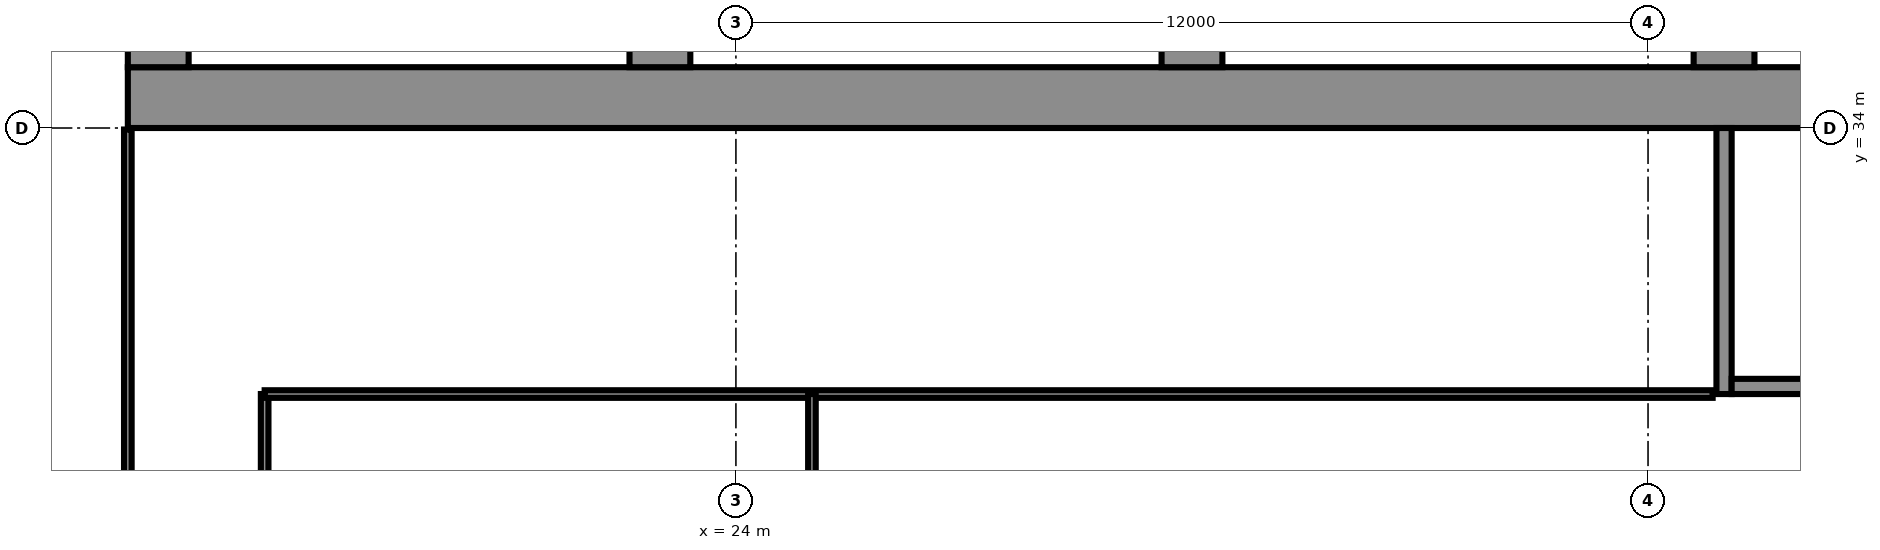
"""IFC4 building model, lengths in metres.
Left out: names, types, materials, properties, quantities, classifications, styles, units other than length and angle.
Written with IfcOpenShell. Run it as: python <this file> out.ifc"""

import sys

from ifc_helpers import new_model, si_unit, direction, frame, frame_2d, origin, place, context, subcontext, project, spatial, polyline, rectangle, outline, extrude, element, fill, save


model = new_model("IFC4")
c1 = context("Model", 3, precision=1e-05, world=origin(), true_north=direction((0.0, 1.0)))
c2 = subcontext(c1, "Body", "Model", "MODEL_VIEW")
j1 = project(units=[si_unit("LENGTHUNIT", "METRE"), si_unit("PLANEANGLEUNIT", "RADIAN")], contexts=[c1])
p1 = place(None, origin())
s1 = spatial("IfcSite", under=j1, at=p1, CompositionType="ELEMENT")
p2 = place(p1, origin())
s2 = spatial("IfcBuilding", under=s1, at=p2, CompositionType="ELEMENT")
p3 = place(p2, frame((0.0, 0.0, 151.9)))
s3 = spatial("IfcBuildingStorey", under=s2, at=p3, CompositionType="ELEMENT", Elevation=151.9)
p4 = place(p3, frame((16.0, 34.4, 0.0), z_axis=(0.0, 0.0, 1.0), x_axis=(1.0, 0.0, 0.0)))
e1 = element("IfcWall", 1, at=p4, inside=s3, PredefinedType="SHEAR", context=c2, shape_type="SweptSolid", body=[
    extrude(rectangle(XDim=42.0, YDim=0.8, at=frame_2d((21.0, 0.0))), origin(), (0.0, 0.0, 1.0), 3.6),
])
p5 = place(p4, frame((3.2, 0.0, 0.0)))
e2 = element("IfcOpeningElement", 2, at=p5, cuts=e1, PredefinedType="OPENING", context=c2, shape_type="SweptSolid", body=[
    extrude(rectangle(XDim=1.0, YDim=2.1, at=frame_2d((0.5, 1.05))), frame((0.0, 0.41, 0.0), z_axis=(0.0, -1.0, 0.0), x_axis=(1.0, 0.0, 0.0)), (0.0, 0.0, 1.0), 0.82),
])
p6 = place(p4, frame((7.65, 0.0, 0.0)))
e3 = element("IfcOpeningElement", 3, at=p6, cuts=e1, PredefinedType="OPENING", context=c2, shape_type="SweptSolid", body=[
    extrude(rectangle(XDim=1.2, YDim=2.1, at=frame_2d((0.6, 1.05))), frame((0.0, 0.41, 0.0), z_axis=(0.0, -1.0, 0.0), x_axis=(1.0, 0.0, 0.0)), (0.0, 0.0, 1.0), 0.82),
])
p7 = place(p4, frame((14.767, 0.0, 0.0)))
e4 = element("IfcOpeningElement", 4, at=p7, cuts=e1, PredefinedType="OPENING", context=c2, shape_type="SweptSolid", body=[
    extrude(rectangle(XDim=1.1, YDim=2.1, at=frame_2d((0.55, 1.05))), frame((0.0, 0.41, 0.0), z_axis=(0.0, -1.0, 0.0), x_axis=(1.0, 0.0, 0.0)), (0.0, 0.0, 1.0), 0.82),
])
p8 = place(p4, frame((19.133, 0.0, 0.0)))
e5 = element("IfcOpeningElement", 5, at=p8, cuts=e1, PredefinedType="OPENING", context=c2, shape_type="SweptSolid", body=[
    extrude(rectangle(XDim=1.1, YDim=2.1, at=frame_2d((0.55, 1.05))), frame((0.0, 0.41, 0.0), z_axis=(0.0, -1.0, 0.0), x_axis=(1.0, 0.0, 0.0)), (0.0, 0.0, 1.0), 0.82),
])
p9 = place(p4, frame((16.8, 0.0, 0.0)))
e6 = element("IfcOpeningElement", 6, at=p9, cuts=e1, PredefinedType="OPENING", context=c2, shape_type="SweptSolid", body=[
    extrude(rectangle(XDim=1.4, YDim=2.1, at=frame_2d((0.7, 1.05))), frame((0.0, 0.41, 0.0), z_axis=(0.0, -1.0, 0.0), x_axis=(1.0, 0.0, 0.0)), (0.0, 0.0, 1.0), 0.82),
])
p10 = place(p4, frame((21.767, 0.0, 0.0)))
e7 = element("IfcOpeningElement", 7, at=p10, cuts=e1, PredefinedType="OPENING", context=c2, shape_type="SweptSolid", body=[
    extrude(rectangle(XDim=1.1, YDim=2.1, at=frame_2d((0.55, 1.05))), frame((0.0, 0.41, 0.0), z_axis=(0.0, -1.0, 0.0), x_axis=(1.0, 0.0, 0.0)), (0.0, 0.0, 1.0), 0.82),
])
p11 = place(p4, frame((23.95, 0.0, 0.0)))
e8 = element("IfcOpeningElement", 8, at=p11, cuts=e1, PredefinedType="OPENING", context=c2, shape_type="SweptSolid", body=[
    extrude(rectangle(XDim=1.1, YDim=2.1, at=frame_2d((0.55, 1.05))), frame((0.0, 0.41, 0.0), z_axis=(0.0, -1.0, 0.0), x_axis=(1.0, 0.0, 0.0)), (0.0, 0.0, 1.0), 0.82),
])
p12 = place(p4, frame((26.133, 0.0, 0.0)))
e9 = element("IfcOpeningElement", 9, at=p12, cuts=e1, PredefinedType="OPENING", context=c2, shape_type="SweptSolid", body=[
    extrude(rectangle(XDim=1.1, YDim=2.1, at=frame_2d((0.55, 1.05))), frame((0.0, 0.41, 0.0), z_axis=(0.0, -1.0, 0.0), x_axis=(1.0, 0.0, 0.0)), (0.0, 0.0, 1.0), 0.82),
])
p13 = place(p4, frame((33.15, 0.0, 0.0)))
e10 = element("IfcOpeningElement", 10, at=p13, cuts=e1, PredefinedType="OPENING", context=c2, shape_type="SweptSolid", body=[
    extrude(rectangle(XDim=1.2, YDim=2.1, at=frame_2d((0.6, 1.05))), frame((0.0, 0.41, 0.0), z_axis=(0.0, -1.0, 0.0), x_axis=(1.0, 0.0, 0.0)), (0.0, 0.0, 1.0), 0.82),
])
p14 = place(p4, frame((35.817, 0.0, 0.0)))
e11 = element("IfcOpeningElement", 11, at=p14, cuts=e1, PredefinedType="OPENING", context=c2, shape_type="SweptSolid", body=[
    extrude(rectangle(XDim=1.0, YDim=2.1, at=frame_2d((0.5, 1.05))), frame((0.0, 0.41, 0.0), z_axis=(0.0, -1.0, 0.0), x_axis=(1.0, 0.0, 0.0)), (0.0, 0.0, 1.0), 0.82),
])
p15 = place(p4, frame((39.95, 0.0, 0.0)))
e12 = element("IfcOpeningElement", 12, at=p15, cuts=e1, PredefinedType="OPENING", context=c2, shape_type="SweptSolid", body=[
    extrude(rectangle(XDim=1.0, YDim=2.1, at=frame_2d((0.5, 1.05))), frame((0.0, 0.41, 0.0), z_axis=(0.0, -1.0, 0.0), x_axis=(1.0, 0.0, 0.0)), (0.0, 0.0, 1.0), 0.82),
])
p16 = place(p4, frame((37.767, 0.0, 0.0)))
e13 = element("IfcOpeningElement", 13, at=p16, cuts=e1, PredefinedType="OPENING", context=c2, shape_type="SweptSolid", body=[
    extrude(rectangle(XDim=1.4, YDim=2.1, at=frame_2d((0.7, 1.05))), frame((0.0, 0.41, 0.0), z_axis=(0.0, -1.0, 0.0), x_axis=(1.0, 0.0, 0.0)), (0.0, 0.0, 1.0), 0.82),
])
p17 = place(p3, frame((16.4, 34.8, 0.0), z_axis=(0.0, 0.0, 1.0), x_axis=(0.0, 1.0, 0.0)))
e14 = element("IfcWall", 14, at=p17, inside=s3, PredefinedType="SHEAR", context=c2, shape_type="SweptSolid", body=[
    extrude(rectangle(XDim=13.184, YDim=0.8, at=frame_2d((6.592, 0.0))), origin(), (0.0, 0.0, 1.0), 3.6),
])
p18 = place(p3, frame((23.0, 34.8, 0.0), z_axis=(0.0, 0.0, 1.0), x_axis=(0.0, 1.0, 0.0)))
e15 = element("IfcWall", 15, at=p18, inside=s3, PredefinedType="SHEAR", context=c2, shape_type="SweptSolid", body=[
    extrude(rectangle(XDim=13.762, YDim=0.8, at=frame_2d((6.881, 0.0))), origin(), (0.0, 0.0, 1.0), 3.6),
])
p19 = place(p18, frame((2.55, 0.0, 0.0)))
e16 = element("IfcOpeningElement", 16, at=p19, cuts=e15, PredefinedType="OPENING", context=c2, shape_type="SweptSolid", body=[
    extrude(rectangle(XDim=1.1, YDim=2.1, at=frame_2d((0.55, 1.05))), frame((0.0, 0.41, 0.0), z_axis=(0.0, -1.0, 0.0), x_axis=(1.0, 0.0, 0.0)), (0.0, 0.0, 1.0), 0.82),
])
p20 = place(p18, frame((10.0, 0.0, 0.0)))
e17 = element("IfcOpeningElement", 17, at=p20, cuts=e15, PredefinedType="OPENING", context=c2, shape_type="SweptSolid", body=[
    extrude(rectangle(XDim=1.0, YDim=2.1, at=frame_2d((0.5, 1.05))), frame((0.0, 0.41, 0.0), z_axis=(0.0, -1.0, 0.0), x_axis=(1.0, 0.0, 0.0)), (0.0, 0.0, 1.0), 0.82),
])
p21 = place(p3, frame((30.0, 34.8, 0.0), z_axis=(0.0, 0.0, 1.0), x_axis=(0.0, 1.0, 0.0)))
e18 = element("IfcWall", 18, at=p21, inside=s3, PredefinedType="SHEAR", context=c2, shape_type="SweptSolid", body=[
    extrude(rectangle(XDim=14.374, YDim=0.8, at=frame_2d((7.187, 0.0))), origin(), (0.0, 0.0, 1.0), 3.6),
])
p22 = place(p21, frame((3.6, 0.0, 0.0)))
e19 = element("IfcOpeningElement", 19, at=p22, cuts=e18, PredefinedType="OPENING", context=c2, shape_type="SweptSolid", body=[
    extrude(rectangle(XDim=1.1, YDim=2.1, at=frame_2d((0.55, 1.05))), frame((0.0, 0.41, 0.0), z_axis=(0.0, -1.0, 0.0), x_axis=(1.0, 0.0, 0.0)), (0.0, 0.0, 1.0), 0.82),
])
p23 = place(p3, frame((37.0, 34.8, 0.0), z_axis=(0.0, 0.0, 1.0), x_axis=(0.0, 1.0, 0.0)))
e20 = element("IfcWall", 20, at=p23, inside=s3, PredefinedType="SHEAR", context=c2, shape_type="SweptSolid", body=[
    extrude(rectangle(XDim=14.987, YDim=0.8, at=frame_2d((7.493, 0.0))), origin(), (0.0, 0.0, 1.0), 3.6),
])
p24 = place(p23, frame((11.312, 0.0, 0.0)))
e21 = element("IfcOpeningElement", 21, at=p24, cuts=e20, PredefinedType="OPENING", context=c2, shape_type="SweptSolid", body=[
    extrude(rectangle(XDim=1.0, YDim=2.1, at=frame_2d((0.5, 1.05))), frame((0.0, 0.41, 0.0), z_axis=(0.0, -1.0, 0.0), x_axis=(1.0, 0.0, 0.0)), (0.0, 0.0, 1.0), 0.82),
])
p25 = place(p23, frame((3.6, 0.0, 0.0)))
e22 = element("IfcOpeningElement", 22, at=p25, cuts=e20, PredefinedType="OPENING", context=c2, shape_type="SweptSolid", body=[
    extrude(rectangle(XDim=1.1, YDim=2.1, at=frame_2d((0.55, 1.05))), frame((0.0, 0.41, 0.0), z_axis=(0.0, -1.0, 0.0), x_axis=(1.0, 0.0, 0.0)), (0.0, 0.0, 1.0), 0.82),
])
p26 = place(p3, origin())
e23 = element("IfcWall", 23, at=p26, inside=s3, PredefinedType="PARTITIONING", context=c2, shape_type="SweptSolid", body=[
    extrude(outline(polyline([(32.233, 37.65), (30.4, 37.65), (30.4, 37.85), (32.233, 37.85), (32.433, 37.85), (32.433, 34.8), (32.233, 34.8), (32.233, 37.65)])), origin(), (0.0, 0.0, 1.0), 3.2),
])
p27 = place(p3, origin())
e24 = element("IfcWall", 24, at=p27, inside=s3, PredefinedType="PARTITIONING", context=c2, shape_type="SweptSolid", body=[
    extrude(outline(polyline([(34.567, 37.85), (34.767, 37.85), (36.6, 37.85), (36.6, 37.65), (34.767, 37.65), (34.767, 34.8), (34.567, 34.8), (34.567, 37.85)])), origin(), (0.0, 0.0, 1.0), 3.2),
])
p28 = place(p3, origin())
e25 = element("IfcWall", 25, at=p28, inside=s3, PredefinedType="PARTITIONING", context=c2, shape_type="SweptSolid", body=[
    extrude(outline(polyline([(41.567, 37.1), (39.433, 37.1), (39.433, 34.8), (39.233, 34.8), (39.233, 37.65), (37.4, 37.65), (37.4, 37.85), (39.233, 37.85), (39.433, 37.85), (39.433, 37.3), (41.567, 37.3), (41.567, 37.55), (41.767, 37.55), (43.6, 37.55), (43.6, 37.35), (41.767, 37.35), (41.767, 34.8), (41.567, 34.8), (41.567, 37.1)])), origin(), (0.0, 0.0, 1.0), 3.2),
])
p29 = place(p3, frame((37.0, 30.5, 0.0), z_axis=(0.0, 0.0, 1.0), x_axis=(0.0, 1.0, 0.0)))
e26 = element("IfcWall", 26, at=p29, inside=s3, PredefinedType="PARTITIONING", context=c2, shape_type="SweptSolid", body=[
    extrude(rectangle(XDim=3.5, YDim=0.2, at=frame_2d((1.75, 0.0))), origin(), (0.0, 0.0, 1.0), 3.2),
])
p30 = place(p29, frame((1.2, 0.0, 0.0)))
e27 = element("IfcOpeningElement", 27, at=p30, cuts=e26, PredefinedType="OPENING", context=c2, shape_type="SweptSolid", body=[
    extrude(rectangle(XDim=1.1, YDim=2.1, at=frame_2d((0.55, 1.05))), frame((0.0, 0.11, 0.0), z_axis=(0.0, -1.0, 0.0), x_axis=(1.0, 0.0, 0.0)), (0.0, 0.0, 1.0), 0.22),
])
p31 = place(p3, frame((37.1, 30.6, 0.0), z_axis=(0.0, 0.0, 1.0), x_axis=(1.0, 0.0, 0.0)))
e28 = element("IfcWall", 28, at=p31, inside=s3, PredefinedType="PARTITIONING", context=c2, shape_type="SweptSolid", body=[
    extrude(rectangle(XDim=2.8, YDim=0.2, at=frame_2d((1.4, 0.0))), origin(), (0.0, 0.0, 1.0), 3.2),
])
p32 = place(p3, frame((16.0, 26.42, 0.0), z_axis=(0.0, 0.0, 1.0), x_axis=(0.0, 1.0, 0.0)))
e29 = element("IfcWall", 29, at=p32, inside=s3, PredefinedType="PARTITIONING", context=c2, shape_type="SweptSolid", body=[
    extrude(rectangle(XDim=7.56, YDim=0.1, at=frame_2d((3.78, 0.0))), origin(), (0.0, 0.0, 1.0), 3.2),
])
p33 = place(p32, frame((2.96, 0.0, 0.0)))
e30 = element("IfcOpeningElement", 30, at=p33, cuts=e29, PredefinedType="OPENING", context=c2, shape_type="SweptSolid", body=[
    extrude(rectangle(XDim=1.8, YDim=2.1, at=frame_2d((0.9, 1.05))), frame((0.0, 0.06, 0.0), z_axis=(0.0, -1.0, 0.0), x_axis=(1.0, 0.0, 0.0)), (0.0, 0.0, 1.0), 0.12),
])
p34 = place(p3, frame((17.8, 24.135, 0.0), z_axis=(0.0, 0.0, 1.0), x_axis=(0.0, 1.0, 0.0)))
e31 = element("IfcWall", 31, at=p34, inside=s3, PredefinedType="PARTITIONING", context=c2, shape_type="SweptSolid", body=[
    extrude(rectangle(XDim=6.365, YDim=0.1, at=frame_2d((3.183, 0.0))), origin(), (0.0, 0.0, 1.0), 3.2),
])
p35 = place(p3, frame((17.8, 30.5, 0.0), z_axis=(0.0, 0.0, 1.0), x_axis=(1.0, 0.0, 0.0)))
e32 = element("IfcWall", 32, at=p35, inside=s3, PredefinedType="PARTITIONING", context=c2, shape_type="SweptSolid", body=[
    extrude(rectangle(XDim=19.05, YDim=0.1, at=frame_2d((9.525, 0.0))), origin(), (0.0, 0.0, 1.0), 3.2),
])
p36 = place(p35, frame((0.545, 0.0, 0.0)))
e33 = element("IfcOpeningElement", 33, at=p36, cuts=e32, PredefinedType="OPENING", context=c2, shape_type="SweptSolid", body=[
    extrude(rectangle(XDim=1.0, YDim=2.1, at=frame_2d((0.5, 1.05))), frame((0.0, 0.06, 0.0), z_axis=(0.0, -1.0, 0.0), x_axis=(1.0, 0.0, 0.0)), (0.0, 0.0, 1.0), 0.12),
])
p37 = place(p35, frame((12.62, 0.0, 0.0)))
e34 = element("IfcOpeningElement", 34, at=p37, cuts=e32, PredefinedType="OPENING", context=c2, shape_type="SweptSolid", body=[
    extrude(rectangle(XDim=1.0, YDim=2.1, at=frame_2d((0.5, 1.05))), frame((0.0, 0.06, 0.0), z_axis=(0.0, -1.0, 0.0), x_axis=(1.0, 0.0, 0.0)), (0.0, 0.0, 1.0), 0.12),
])
p38 = place(p3, frame((25.0, 15.27, 0.0), z_axis=(0.0, 0.0, 1.0), x_axis=(0.0, 1.0, 0.0)))
e35 = element("IfcWall", 35, at=p38, inside=s3, PredefinedType="PARTITIONING", context=c2, shape_type="SweptSolid", body=[
    extrude(rectangle(XDim=15.23, YDim=0.1, at=frame_2d((7.615, 0.0))), origin(), (0.0, 0.0, 1.0), 3.2),
])
p39 = place(p5, origin())
e36 = element("IfcDoor", 36, at=p39, inside=s3, OperationType="SINGLE_SWING_LEFT", PredefinedType="DOOR", context=c2, shape_type="SweptSolid", body=[
    extrude(rectangle(XDim=1.0, YDim=2.1, at=frame_2d((0.5, 1.05))), frame((0.0, 0.4, 0.0), z_axis=(0.0, -1.0, 0.0), x_axis=(1.0, 0.0, 0.0)), (0.0, 0.0, 1.0), 0.8),
])
fill(e2, e36)
p40 = place(p6, origin())
e37 = element("IfcDoor", 37, at=p40, inside=s3, OperationType="SINGLE_SWING_LEFT", PredefinedType="DOOR", context=c2, shape_type="SweptSolid", body=[
    extrude(rectangle(XDim=1.2, YDim=2.1, at=frame_2d((0.6, 1.05))), frame((0.0, 0.025, 0.0), z_axis=(0.0, -1.0, 0.0), x_axis=(1.0, 0.0, 0.0)), (0.0, 0.0, 1.0), 0.05),
])
fill(e3, e37)
p41 = place(p7, origin())
e38 = element("IfcDoor", 38, at=p41, inside=s3, OperationType="DOUBLE_DOOR_SLIDING", PredefinedType="DOOR", context=c2, shape_type="SweptSolid", body=[
    extrude(rectangle(XDim=1.1, YDim=2.1, at=frame_2d((0.55, 1.05))), frame((0.0, 0.025, 0.0), z_axis=(0.0, -1.0, 0.0), x_axis=(1.0, 0.0, 0.0)), (0.0, 0.0, 1.0), 0.05),
])
fill(e4, e38)
p42 = place(p8, origin())
e39 = element("IfcDoor", 39, at=p42, inside=s3, OperationType="DOUBLE_DOOR_SLIDING", PredefinedType="DOOR", context=c2, shape_type="SweptSolid", body=[
    extrude(rectangle(XDim=1.1, YDim=2.1, at=frame_2d((0.55, 1.05))), frame((0.0, 0.025, 0.0), z_axis=(0.0, -1.0, 0.0), x_axis=(1.0, 0.0, 0.0)), (0.0, 0.0, 1.0), 0.05),
])
fill(e5, e39)
p43 = place(p9, origin())
e40 = element("IfcDoor", 40, at=p43, inside=s3, OperationType="DOUBLE_DOOR_SINGLE_SWING", PredefinedType="DOOR", context=c2, shape_type="SweptSolid", body=[
    extrude(rectangle(XDim=1.4, YDim=2.1, at=frame_2d((0.7, 1.05))), frame((0.0, 0.025, 0.0), z_axis=(0.0, -1.0, 0.0), x_axis=(1.0, 0.0, 0.0)), (0.0, 0.0, 1.0), 0.05),
])
fill(e6, e40)
p44 = place(p10, origin())
e41 = element("IfcDoor", 41, at=p44, inside=s3, OperationType="DOUBLE_DOOR_SLIDING", PredefinedType="DOOR", context=c2, shape_type="SweptSolid", body=[
    extrude(rectangle(XDim=1.1, YDim=2.1, at=frame_2d((0.55, 1.05))), frame((0.0, 0.025, 0.0), z_axis=(0.0, -1.0, 0.0), x_axis=(1.0, 0.0, 0.0)), (0.0, 0.0, 1.0), 0.05),
])
fill(e7, e41)
p45 = place(p30, origin())
e42 = element("IfcDoor", 42, at=p45, inside=s3, OperationType="SINGLE_SWING_LEFT", PredefinedType="DOOR", context=c2, shape_type="SweptSolid", body=[
    extrude(rectangle(XDim=1.1, YDim=2.1, at=frame_2d((0.55, 1.05))), frame((0.0, 0.025, 0.0), z_axis=(0.0, -1.0, 0.0), x_axis=(1.0, 0.0, 0.0)), (0.0, 0.0, 1.0), 0.05),
])
fill(e27, e42)
p46 = place(p33, origin())
e43 = element("IfcDoor", 43, at=p46, inside=s3, OperationType="DOUBLE_DOOR_SINGLE_SWING", PredefinedType="DOOR", context=c2, shape_type="SweptSolid", body=[
    extrude(rectangle(XDim=1.8, YDim=2.1, at=frame_2d((0.9, 1.05))), frame((0.0, 0.025, 0.0), z_axis=(0.0, -1.0, 0.0), x_axis=(1.0, 0.0, 0.0)), (0.0, 0.0, 1.0), 0.05),
])
fill(e30, e43)
p47 = place(p36, origin())
e44 = element("IfcDoor", 44, at=p47, inside=s3, OperationType="SINGLE_SWING_LEFT", PredefinedType="DOOR", context=c2, shape_type="SweptSolid", body=[
    extrude(rectangle(XDim=1.0, YDim=2.1, at=frame_2d((0.5, 1.05))), frame((0.0, 0.025, 0.0), z_axis=(0.0, -1.0, 0.0), x_axis=(1.0, 0.0, 0.0)), (0.0, 0.0, 1.0), 0.05),
])
fill(e33, e44)
p48 = place(p37, origin())
e45 = element("IfcDoor", 45, at=p48, inside=s3, OperationType="SINGLE_SWING_LEFT", PredefinedType="DOOR", context=c2, shape_type="SweptSolid", body=[
    extrude(rectangle(XDim=1.0, YDim=2.1, at=frame_2d((0.5, 1.05))), frame((0.0, 0.025, 0.0), z_axis=(0.0, -1.0, 0.0), x_axis=(1.0, 0.0, 0.0)), (0.0, 0.0, 1.0), 0.05),
])
fill(e34, e45)
save(model, sys.argv[1])
